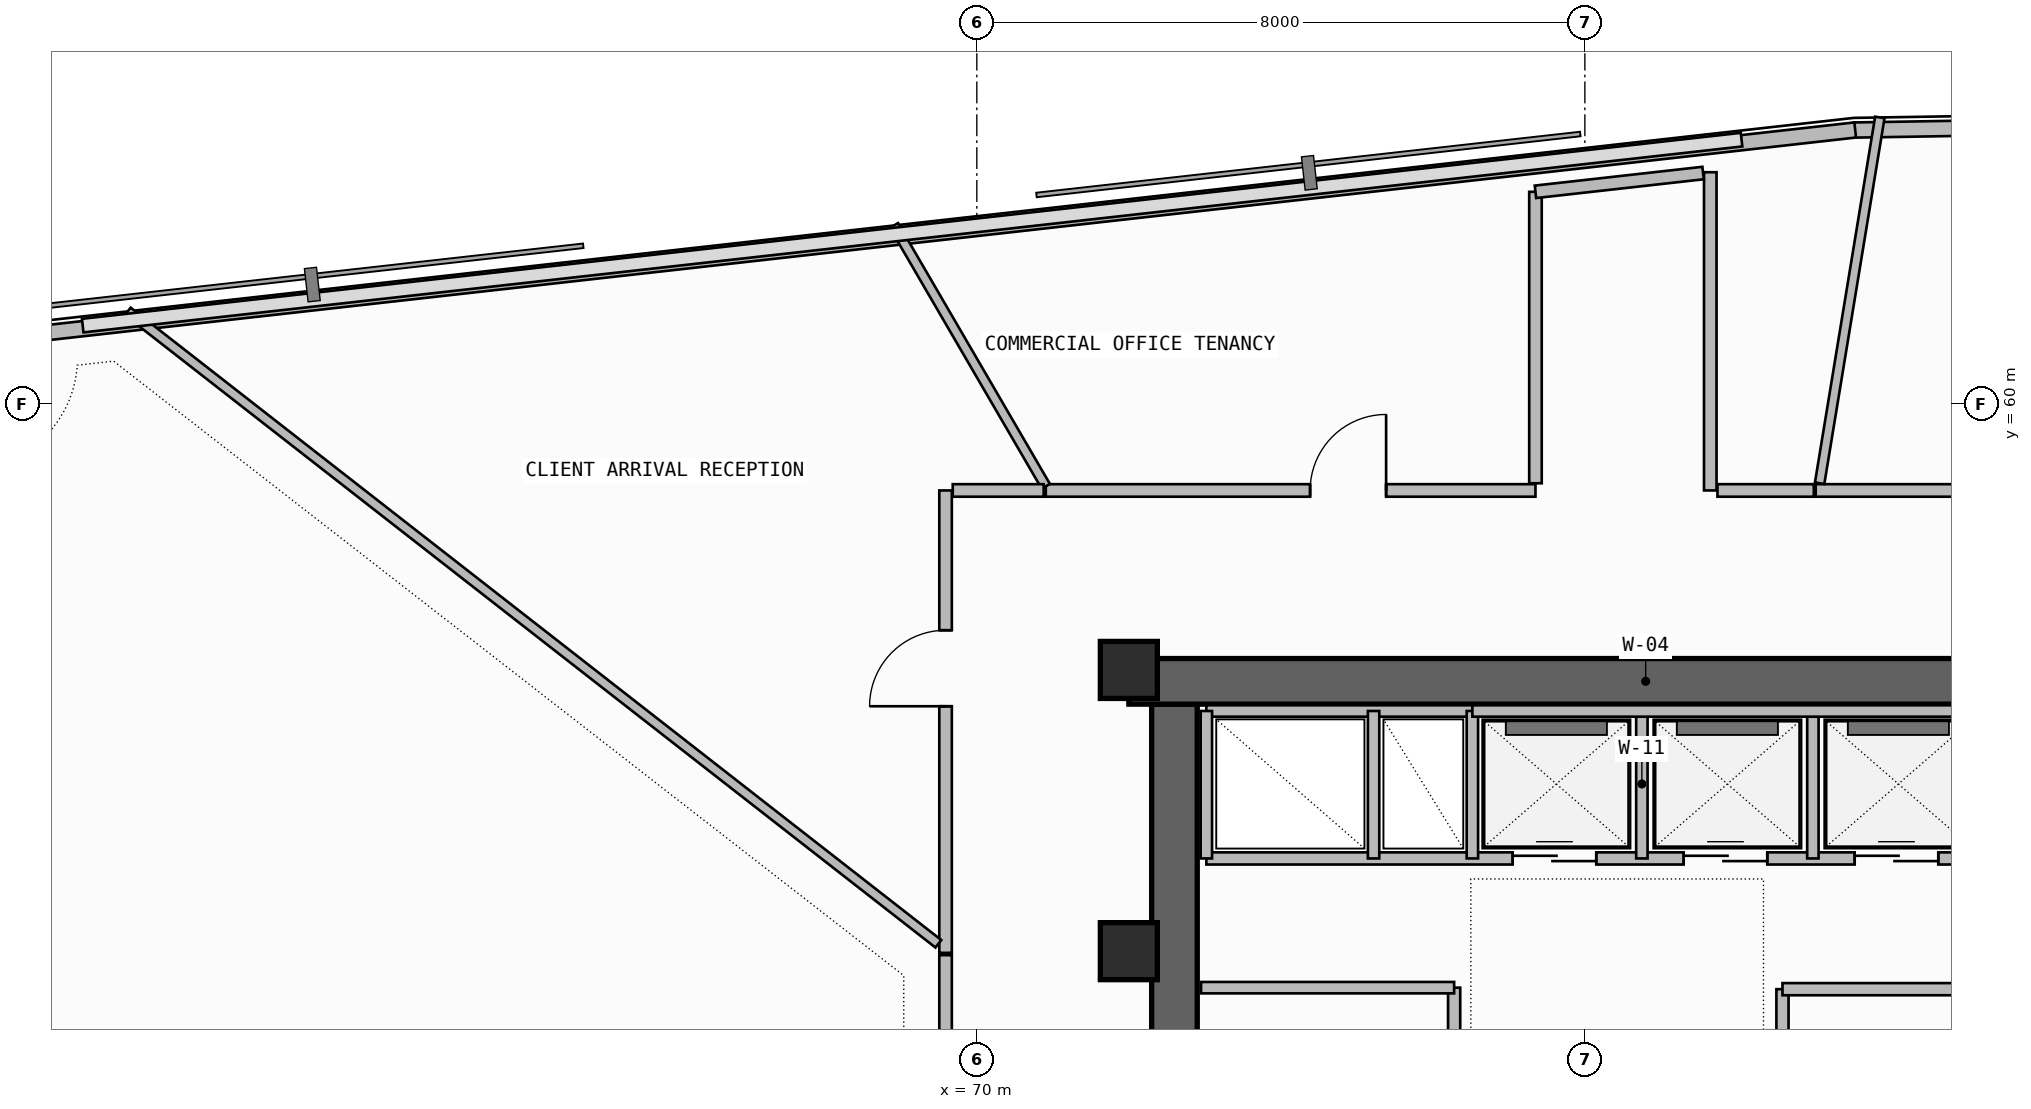
"""IFC4 building model, lengths in metres.
Left out: names, types, materials, properties, quantities, classifications, styles, units other than length and angle.
Written with IfcOpenShell. Run it as: python <this file> out.ifc"""

import sys

from ifc_helpers import new_model, si_unit, direction, frame, frame_2d, origin, origin_2d, place, context, subcontext, project, spatial, rectangle, extrude, element, fill, save


model = new_model("IFC4")
c1 = context("Model", 3, precision=1e-05, world=origin(), true_north=direction((0.0, 1.0)))
c2 = subcontext(c1, "Body", "Model", "MODEL_VIEW")
j1 = project(units=[si_unit("LENGTHUNIT", "METRE"), si_unit("PLANEANGLEUNIT", "RADIAN")], contexts=[c1])
p1 = place(None, origin())
s1 = spatial("IfcSite", under=j1, at=p1, CompositionType="ELEMENT")
p2 = place(p1, origin())
s2 = spatial("IfcBuilding", under=s1, at=p2, CompositionType="ELEMENT")
p3 = place(p2, frame((0.0, 0.0, 278.34)))
s3 = spatial("IfcBuildingStorey", under=s2, at=p3, CompositionType="ELEMENT", Elevation=278.34)
p4 = place(p3, frame((72.6, 43.35, -0.26), z_axis=(0.0, 0.0, 1.0), x_axis=(0.0, 1.0, 0.0)))
e1 = element("IfcWall", 1, at=p4, inside=s3, PredefinedType="SHEAR", context=c2, shape_type="SweptSolid", body=[
    extrude(rectangle(XDim=12.7, YDim=0.6, at=frame_2d((6.35, 0.0))), origin(), (0.0, 0.0, 1.0), 3.52),
])
p5 = place(p4, frame((1.35, 0.0, 0.26)))
e2 = element("IfcOpeningElement", 2, at=p5, cuts=e1, PredefinedType="OPENING", context=c2, shape_type="SweptSolid", body=[
    extrude(rectangle(XDim=1.2, YDim=2.2, at=frame_2d((0.6, 1.1))), frame((0.0, 0.31, 0.0), z_axis=(0.0, -1.0, 0.0), x_axis=(1.0, 0.0, 0.0)), (0.0, 0.0, 1.0), 0.62),
])
p6 = place(p3, frame((72.0, 56.35, -0.26), z_axis=(0.0, 0.0, 1.0), x_axis=(1.0, 0.0, 0.0)))
e3 = element("IfcWall", 3, at=p6, inside=s3, PredefinedType="SHEAR", context=c2, shape_type="SweptSolid", body=[
    extrude(rectangle(XDim=13.6, YDim=0.6, at=frame_2d((6.8, 0.0))), origin(), (0.0, 0.0, 1.0), 3.52),
])
for number, where, z_axis, x_axis in (
    (4, (72.0, 52.8, 0.0), (0.0, 0.0, 1.0), (1.0, 0.0, 0.0)),
    (5, (72.0, 56.5, 0.0), (0.0, 0.0, 1.0), (1.0, 0.0, 0.0)),
):
    element("IfcColumn", number, at=place(p3, frame(where, z_axis=z_axis, x_axis=x_axis)), inside=s3, PredefinedType="COLUMN", context=c2, shape_type="SweptSolid", body=[
        extrude(rectangle(XDim=0.75, YDim=0.75, at=origin_2d()), origin(), (0.0, 0.0, 1.0), 3.52),
    ])
p7 = place(p3, frame((54.805, 53.812, -0.26), z_axis=(0.0, 0.0, 1.0), x_axis=(0.678803115619, -0.734320318543, 0.0)))
e6 = element("IfcWall", 6, at=p7, inside=s3, PredefinedType="SHEAR", context=c2, shape_type="SweptSolid", body=[
    extrude(rectangle(XDim=18.083, YDim=0.55, at=frame_2d((9.042, 0.0))), origin(), (0.0, 0.0, 1.0), 3.52),
])
p8 = place(p7, frame((7.434, 0.0, 1.1)))
e7 = element("IfcOpeningElement", 7, at=p8, cuts=e6, PredefinedType="OPENING", context=c2, shape_type="SweptSolid", body=[
    extrude(rectangle(XDim=2.4, YDim=1.2, at=frame_2d((1.2, 0.6))), frame((0.0, 0.285, 0.0), z_axis=(0.0, -1.0, 0.0), x_axis=(1.0, 0.0, 0.0)), (0.0, 0.0, 1.0), 0.57),
])
p9 = place(p3, frame((111.271, 64.092, 0.0), z_axis=(0.0, 0.0, 1.0), x_axis=(-0.999864741935, -0.016446818413, 0.0)))
e8 = element("IfcWall", 8, at=p9, inside=s3, PredefinedType="PARAPET", context=c2, shape_type="SweptSolid", body=[
    extrude(rectangle(XDim=29.733, YDim=0.2, at=frame_2d((14.866, 0.0))), origin(), (0.0, 0.0, 1.0), 1.15),
])
p10 = place(p3, frame((81.557, 63.604, 0.0), z_axis=(0.0, 0.0, 1.0), x_axis=(-0.993776455024, -0.111392806945, 0.0)))
e9 = element("IfcWall", 9, at=p10, inside=s3, PredefinedType="PARAPET", context=c2, shape_type="SweptSolid", body=[
    extrude(rectangle(XDim=24.891, YDim=0.2, at=frame_2d((12.446, 0.0))), origin(), (0.0, 0.0, 1.0), 1.15),
])
p11 = place(p3, frame((76.28, 47.18, 0.0), z_axis=(0.0, 0.0, 1.0), x_axis=(0.0, 1.0, 0.0)))
e10 = element("IfcWall", 10, at=p11, inside=s3, PredefinedType="SOLIDWALL", context=c2, shape_type="SweptSolid", body=[
    extrude(rectangle(XDim=5.14, YDim=0.16, at=frame_2d((2.57, 0.0))), origin(), (0.0, 0.0, 1.0), 3.26),
])
p12 = place(p11, frame((1.05, 0.0, 0.0)))
e11 = element("IfcOpeningElement", 11, at=p12, cuts=e10, PredefinedType="OPENING", context=c2, shape_type="SweptSolid", body=[
    extrude(rectangle(XDim=1.0, YDim=2.2, at=frame_2d((0.5, 1.1))), frame((0.0, 0.09, 0.0), z_axis=(0.0, -1.0, 0.0), x_axis=(1.0, 0.0, 0.0)), (0.0, 0.0, 1.0), 0.18),
])
p13 = place(p11, frame((3.45, 0.0, 0.0)))
e12 = element("IfcOpeningElement", 12, at=p13, cuts=e10, PredefinedType="OPENING", context=c2, shape_type="SweptSolid", body=[
    extrude(rectangle(XDim=0.9, YDim=2.1, at=frame_2d((0.45, 1.05))), frame((0.0, 0.09, 0.0), z_axis=(0.0, -1.0, 0.0), x_axis=(1.0, 0.0, 0.0)), (0.0, 0.0, 1.0), 0.18),
])
p14 = place(p3, frame((72.95, 52.32, 0.0), z_axis=(0.0, 0.0, 1.0), x_axis=(1.0, 0.0, 0.0)))
e13 = element("IfcWall", 13, at=p14, inside=s3, PredefinedType="SOLIDWALL", context=c2, shape_type="SweptSolid", body=[
    extrude(rectangle(XDim=3.33, YDim=0.15, at=frame_2d((1.665, 0.0))), origin(), (0.0, 0.0, 1.0), 3.26),
])
p15 = place(p3, frame((80.6, 47.7, 0.0), z_axis=(0.0, 0.0, 1.0), x_axis=(0.0, 1.0, 0.0)))
e14 = element("IfcWall", 14, at=p15, inside=s3, PredefinedType="SOLIDWALL", context=c2, shape_type="SweptSolid", body=[
    extrude(rectangle(XDim=4.6, YDim=0.16, at=frame_2d((2.3, 0.0))), origin(), (0.0, 0.0, 1.0), 3.26),
])
p16 = place(p15, frame((0.75, 0.0, 0.0)))
e15 = element("IfcOpeningElement", 15, at=p16, cuts=e14, PredefinedType="OPENING", context=c2, shape_type="SweptSolid", body=[
    extrude(rectangle(XDim=1.0, YDim=2.2, at=frame_2d((0.5, 1.1))), frame((0.0, 0.09, 0.0), z_axis=(0.0, -1.0, 0.0), x_axis=(1.0, 0.0, 0.0)), (0.0, 0.0, 1.0), 0.18),
])
p17 = place(p15, frame((2.95, 0.0, 0.0)))
e16 = element("IfcOpeningElement", 16, at=p17, cuts=e14, PredefinedType="OPENING", context=c2, shape_type="SweptSolid", body=[
    extrude(rectangle(XDim=0.9, YDim=2.1, at=frame_2d((0.45, 1.05))), frame((0.0, 0.09, 0.0), z_axis=(0.0, -1.0, 0.0), x_axis=(1.0, 0.0, 0.0)), (0.0, 0.0, 1.0), 0.18),
])
p18 = place(p3, frame((80.6, 52.3, 0.0), z_axis=(0.0, 0.0, 1.0), x_axis=(1.0, 0.0, 0.0)))
e17 = element("IfcWall", 17, at=p18, inside=s3, PredefinedType="SOLIDWALL", context=c2, shape_type="SweptSolid", body=[
    extrude(rectangle(XDim=4.22, YDim=0.16, at=frame_2d((2.11, 0.0))), origin(), (0.0, 0.0, 1.0), 3.26),
])
p19 = place(p3, frame((73.02, 54.02, 0.0), z_axis=(0.0, 0.0, 1.0), x_axis=(1.0, 0.0, 0.0)))
e18 = element("IfcWall", 18, at=p19, inside=s3, PredefinedType="SOLIDWALL", context=c2, shape_type="SweptSolid", body=[
    extrude(rectangle(XDim=12.08, YDim=0.16, at=frame_2d((6.04, 0.0))), origin(), (0.0, 0.0, 1.0), 3.26),
])
p20 = place(p19, frame((4.03, 0.0, 0.0)))
e19 = element("IfcOpeningElement", 19, at=p20, cuts=e18, PredefinedType="OPENING", context=c2, shape_type="SweptSolid", body=[
    extrude(rectangle(XDim=1.1, YDim=2.25, at=frame_2d((0.55, 1.125))), frame((0.0, 0.09, 0.0), z_axis=(0.0, -1.0, 0.0), x_axis=(1.0, 0.0, 0.0)), (0.0, 0.0, 1.0), 0.18),
])
p21 = place(p19, frame((6.28, 0.0, 0.0)))
e20 = element("IfcOpeningElement", 20, at=p21, cuts=e18, PredefinedType="OPENING", context=c2, shape_type="SweptSolid", body=[
    extrude(rectangle(XDim=1.1, YDim=2.25, at=frame_2d((0.55, 1.125))), frame((0.0, 0.09, 0.0), z_axis=(0.0, -1.0, 0.0), x_axis=(1.0, 0.0, 0.0)), (0.0, 0.0, 1.0), 0.18),
])
p22 = place(p19, frame((8.53, 0.0, 0.0)))
e21 = element("IfcOpeningElement", 21, at=p22, cuts=e18, PredefinedType="OPENING", context=c2, shape_type="SweptSolid", body=[
    extrude(rectangle(XDim=1.1, YDim=2.25, at=frame_2d((0.55, 1.125))), frame((0.0, 0.09, 0.0), z_axis=(0.0, -1.0, 0.0), x_axis=(1.0, 0.0, 0.0)), (0.0, 0.0, 1.0), 0.18),
])
p23 = place(p3, frame((73.02, 55.96, 0.0), z_axis=(0.0, 0.0, 1.0), x_axis=(1.0, 0.0, 0.0)))
e22 = element("IfcWall", 22, at=p23, inside=s3, PredefinedType="SOLIDWALL", context=c2, shape_type="SweptSolid", body=[
    extrude(rectangle(XDim=3.5, YDim=0.15, at=frame_2d((1.75, 0.0))), origin(), (0.0, 0.0, 1.0), 3.26),
])
p24 = place(p3, frame((73.02, 54.02, 0.0), z_axis=(0.0, 0.0, 1.0), x_axis=(0.0, 1.0, 0.0)))
e23 = element("IfcWall", 23, at=p24, inside=s3, PredefinedType="PLUMBINGWALL", context=c2, shape_type="SweptSolid", body=[
    extrude(rectangle(XDim=1.94, YDim=0.15, at=frame_2d((0.97, 0.0))), origin(), (0.0, 0.0, 1.0), 3.26),
])
p25 = place(p3, frame((76.52, 54.02, 0.0), z_axis=(0.0, 0.0, 1.0), x_axis=(0.0, 1.0, 0.0)))
e24 = element("IfcWall", 24, at=p25, inside=s3, PredefinedType="SOLIDWALL", context=c2, shape_type="SweptSolid", body=[
    extrude(rectangle(XDim=1.94, YDim=0.15, at=frame_2d((0.97, 0.0))), origin(), (0.0, 0.0, 1.0), 3.26),
])
p26 = place(p3, frame((75.22, 54.02, 0.0), z_axis=(0.0, 0.0, 1.0), x_axis=(0.0, 1.0, 0.0)))
e25 = element("IfcWall", 25, at=p26, inside=s3, PredefinedType="PLUMBINGWALL", context=c2, shape_type="SweptSolid", body=[
    extrude(rectangle(XDim=1.94, YDim=0.15, at=frame_2d((0.97, 0.0))), origin(), (0.0, 0.0, 1.0), 3.26),
])
for number, where, z_axis, x_axis in (
    (26, (78.75, 54.02, 0.0), (0.0, 0.0, 1.0), (0.0, 1.0, 0.0)),
    (27, (81.0, 54.02, 0.0), (0.0, 0.0, 1.0), (0.0, 1.0, 0.0)),
):
    element("IfcWall", number, at=place(p3, frame(where, z_axis=z_axis, x_axis=x_axis)), inside=s3, PredefinedType="PLUMBINGWALL", context=c2, shape_type="SweptSolid", body=[
        extrude(rectangle(XDim=1.96, YDim=0.15, at=frame_2d((0.98, 0.0))), origin(), (0.0, 0.0, 1.0), 3.26),
    ])
p27 = place(p3, frame((76.52, 55.96, 0.0), z_axis=(0.0, 0.0, 1.0), x_axis=(1.0, 0.0, 0.0)))
e28 = element("IfcWall", 28, at=p27, inside=s3, PredefinedType="SOLIDWALL", context=c2, shape_type="SweptSolid", body=[
    extrude(rectangle(XDim=6.7, YDim=0.15, at=frame_2d((3.35, 0.0))), origin(), (0.0, 0.0, 1.0), 3.26),
])
p28 = place(p3, frame((87.961, 58.861, 0.0), z_axis=(0.0, 0.0, 1.0), x_axis=(-1.0, 0.0, 0.0)))
e29 = element("IfcWall", 29, at=p28, inside=s3, PredefinedType="PARTITIONING", context=c2, shape_type="SweptSolid", body=[
    extrude(rectangle(XDim=6.925, YDim=0.165, at=frame_2d((3.462, 0.0))), origin(), (0.0, 0.0, 1.0), 2.745),
])
p29 = place(p28, frame((3.791, 0.0, 0.0)))
e30 = element("IfcOpeningElement", 30, at=p29, cuts=e29, PredefinedType="OPENING", context=c2, shape_type="SweptSolid", body=[
    extrude(rectangle(XDim=1.0, YDim=2.2, at=frame_2d((0.5, 1.1))), frame((0.0, 0.093, 0.0), z_axis=(0.0, -1.0, 0.0), x_axis=(1.0, 0.0, 0.0)), (0.0, 0.0, 1.0), 0.185),
])
p30 = place(p3, frame((81.089, 58.956, 0.0), z_axis=(0.0, 0.0, 1.0), x_axis=(0.162336796207, 0.986735407593, 0.0)))
e31 = element("IfcWall", 31, at=p30, inside=s3, PredefinedType="PARTITIONING", context=c2, shape_type="SweptSolid", body=[
    extrude(rectangle(XDim=4.877, YDim=0.125, at=frame_2d((2.438, 0.0))), origin(), (0.0, 0.0, 1.0), 3.26),
])
p31 = place(p3, frame((77.35, 58.861, 0.0), z_axis=(0.0, 0.0, 1.0), x_axis=(-1.0, 0.0, 0.0)))
e32 = element("IfcWall", 32, at=p31, inside=s3, PredefinedType="PARTITIONING", context=c2, shape_type="SweptSolid", body=[
    extrude(rectangle(XDim=6.443, YDim=0.165, at=frame_2d((3.221, 0.0))), origin(), (0.0, 0.0, 1.0), 3.26),
])
p32 = place(p31, frame((1.965, 0.0, 0.0)))
e33 = element("IfcOpeningElement", 33, at=p32, cuts=e32, PredefinedType="OPENING", context=c2, shape_type="SweptSolid", body=[
    extrude(rectangle(XDim=1.0, YDim=2.2, at=frame_2d((0.5, 1.1))), frame((0.0, 0.093, 0.0), z_axis=(0.0, -1.0, 0.0), x_axis=(1.0, 0.0, 0.0)), (0.0, 0.0, 1.0), 0.185),
])
p33 = place(p3, frame((79.65, 58.861, 0.0), z_axis=(0.0, 0.0, 1.0), x_axis=(0.0, 1.0, 0.0)))
e34 = element("IfcWall", 34, at=p33, inside=s3, PredefinedType="PARTITIONING", context=c2, shape_type="SweptSolid", body=[
    extrude(rectangle(XDim=4.187, YDim=0.165, at=frame_2d((2.093, 0.0))), origin(), (0.0, 0.0, 1.0), 3.26),
])
p34 = place(p3, frame((77.35, 62.79, 0.0), z_axis=(0.0, 0.0, 1.0), x_axis=(0.0, -1.0, 0.0)))
e35 = element("IfcWall", 35, at=p34, inside=s3, PredefinedType="PARTITIONING", context=c2, shape_type="SweptSolid", body=[
    extrude(rectangle(XDim=3.834, YDim=0.165, at=frame_2d((1.917, 0.0))), origin(), (0.0, 0.0, 1.0), 3.26),
])
p35 = place(p3, frame((79.555, 63.037, 0.0), z_axis=(0.0, 0.0, 1.0), x_axis=(-0.993770518254, -0.11144575833, 0.0)))
e36 = element("IfcWall", 36, at=p35, inside=s3, PredefinedType="PARTITIONING", context=c2, shape_type="SweptSolid", body=[
    extrude(rectangle(XDim=2.219, YDim=0.165, at=frame_2d((1.11, 0.0))), origin(), (0.0, 0.0, 1.0), 3.26),
])
p36 = place(p3, frame((81.012, 58.861, 0.0), z_axis=(0.0, 0.0, 1.0), x_axis=(-1.0, 0.0, 0.0)))
e37 = element("IfcWall", 37, at=p36, inside=s3, PredefinedType="PARTITIONING", context=c2, shape_type="SweptSolid", body=[
    extrude(rectangle(XDim=1.268, YDim=0.165, at=frame_2d((0.634, 0.0))), origin(), (0.0, 0.0, 1.0), 3.26),
])
p37 = place(p3, frame((70.907, 58.916, 0.0), z_axis=(0.0, 0.0, 1.0), x_axis=(-0.503247693996, 0.864142209644, 0.0)))
e38 = element("IfcWall", 38, at=p37, inside=s3, PredefinedType="PARTITIONING", context=c2, shape_type="SweptSolid", body=[
    extrude(rectangle(XDim=3.97, YDim=0.125, at=frame_2d((1.985, 0.0))), origin(), (0.0, 0.0, 1.0), 3.26),
])
p38 = place(p3, frame((69.589, 58.861, 0.0), z_axis=(0.0, 0.0, 1.0), x_axis=(0.0, -1.0, 0.0)))
e39 = element("IfcWall", 39, at=p38, inside=s3, PredefinedType="PARTITIONING", context=c2, shape_type="SweptSolid", body=[
    extrude(rectangle(XDim=6.083, YDim=0.165, at=frame_2d((3.042, 0.0))), origin(), (0.0, 0.0, 1.0), 2.745),
])
p39 = place(p38, frame((1.839, 0.0, 0.0)))
e40 = element("IfcOpeningElement", 40, at=p39, cuts=e39, PredefinedType="OPENING", context=c2, shape_type="SweptSolid", body=[
    extrude(rectangle(XDim=1.0, YDim=2.2, at=frame_2d((0.5, 1.1))), frame((0.0, 0.093, 0.0), z_axis=(0.0, -1.0, 0.0), x_axis=(1.0, 0.0, 0.0)), (0.0, 0.0, 1.0), 0.185),
])
p40 = place(p3, frame((70.879, 58.861, 0.0), z_axis=(0.0, 0.0, 1.0), x_axis=(-1.0, 0.0, 0.0)))
e41 = element("IfcWall", 41, at=p40, inside=s3, PredefinedType="PARTITIONING", context=c2, shape_type="SweptSolid", body=[
    extrude(rectangle(XDim=1.196, YDim=0.165, at=frame_2d((0.598, 0.0))), origin(), (0.0, 0.0, 1.0), 3.26),
])
p41 = place(p3, frame((69.494, 52.897, 0.0), z_axis=(0.0, 0.0, 1.0), x_axis=(-0.788467994184, 0.615075785694, 0.0)))
e42 = element("IfcWall", 42, at=p41, inside=s3, PredefinedType="PARTITIONING", context=c2, shape_type="SweptSolid", body=[
    extrude(rectangle(XDim=13.527, YDim=0.125, at=frame_2d((6.763, 0.0))), origin(), (0.0, 0.0, 1.0), 2.745),
])
p42 = place(p3, frame((69.589, 52.748, 0.0), z_axis=(0.0, 0.0, 1.0), x_axis=(0.0, -1.0, 0.0)))
e43 = element("IfcWall", 43, at=p42, inside=s3, PredefinedType="PARTITIONING", context=c2, shape_type="SweptSolid", body=[
    extrude(rectangle(XDim=7.531, YDim=0.165, at=frame_2d((3.766, 0.0))), origin(), (0.0, 0.0, 1.0), 2.745),
])
p43 = place(p42, frame((3.266, 0.0, 0.0)))
e44 = element("IfcOpeningElement", 44, at=p43, cuts=e43, PredefinedType="OPENING", context=c2, shape_type="SweptSolid", body=[
    extrude(rectangle(XDim=1.0, YDim=2.2, at=frame_2d((0.5, 1.1))), frame((0.0, 0.093, 0.0), z_axis=(0.0, -1.0, 0.0), x_axis=(1.0, 0.0, 0.0)), (0.0, 0.0, 1.0), 0.185),
])
p44 = place(p20, origin())
e45 = element("IfcDoor", 45, at=p44, inside=s3, OperationType="DOUBLE_DOOR_SLIDING", PredefinedType="DOOR", context=c2, shape_type="SweptSolid", body=[
    extrude(rectangle(XDim=1.1, YDim=2.25, at=frame_2d((0.55, 1.125))), frame((0.0, 0.025, 0.0), z_axis=(0.0, -1.0, 0.0), x_axis=(1.0, 0.0, 0.0)), (0.0, 0.0, 1.0), 0.05),
])
fill(e19, e45)
p45 = place(p21, origin())
e46 = element("IfcDoor", 46, at=p45, inside=s3, OperationType="DOUBLE_DOOR_SLIDING", PredefinedType="DOOR", context=c2, shape_type="SweptSolid", body=[
    extrude(rectangle(XDim=1.1, YDim=2.25, at=frame_2d((0.55, 1.125))), frame((0.0, 0.025, 0.0), z_axis=(0.0, -1.0, 0.0), x_axis=(1.0, 0.0, 0.0)), (0.0, 0.0, 1.0), 0.05),
])
fill(e20, e46)
p46 = place(p22, origin())
e47 = element("IfcDoor", 47, at=p46, inside=s3, OperationType="DOUBLE_DOOR_SLIDING", PredefinedType="DOOR", context=c2, shape_type="SweptSolid", body=[
    extrude(rectangle(XDim=1.1, YDim=2.25, at=frame_2d((0.55, 1.125))), frame((0.0, 0.025, 0.0), z_axis=(0.0, -1.0, 0.0), x_axis=(1.0, 0.0, 0.0)), (0.0, 0.0, 1.0), 0.05),
])
fill(e21, e47)
p47 = place(p32, frame((1.0, 0.0, 0.0), z_axis=(0.0, 0.0, 1.0), x_axis=(-1.0, 0.0, 0.0)))
e48 = element("IfcDoor", 48, at=p47, inside=s3, OperationType="SINGLE_SWING_RIGHT", PredefinedType="DOOR", context=c2, shape_type="SweptSolid", body=[
    extrude(rectangle(XDim=1.0, YDim=2.2, at=frame_2d((0.5, 1.1))), frame((0.0, 0.025, 0.0), z_axis=(0.0, -1.0, 0.0), x_axis=(1.0, 0.0, 0.0)), (0.0, 0.0, 1.0), 0.05),
])
fill(e33, e48)
p48 = place(p39, frame((1.0, 0.0, 0.0), z_axis=(0.0, 0.0, 1.0), x_axis=(-1.0, 0.0, 0.0)))
e49 = element("IfcDoor", 49, at=p48, inside=s3, OperationType="SINGLE_SWING_LEFT", PredefinedType="DOOR", context=c2, shape_type="SweptSolid", body=[
    extrude(rectangle(XDim=1.0, YDim=2.2, at=frame_2d((0.5, 1.1))), frame((0.0, 0.025, 0.0), z_axis=(0.0, -1.0, 0.0), x_axis=(1.0, 0.0, 0.0)), (0.0, 0.0, 1.0), 0.05),
])
fill(e40, e49)
save(model, sys.argv[1])
